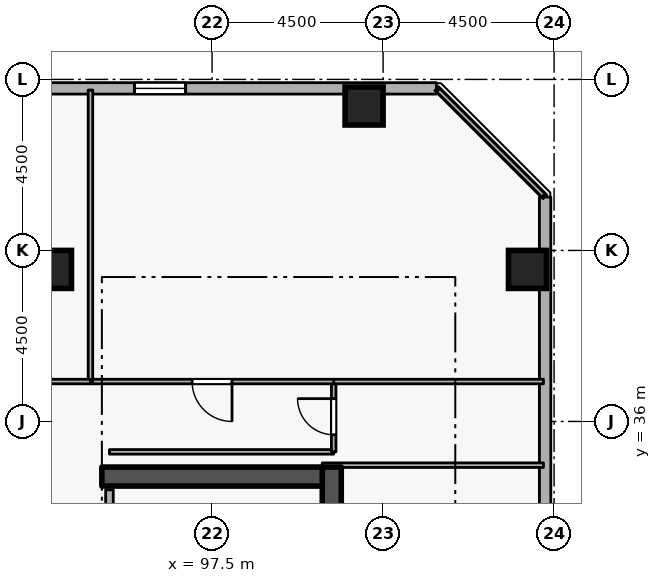
"""IFC4 building model, lengths in metres.
Left out: names, types, materials, properties, quantities, classifications, styles, units other than length and angle.
Written with IfcOpenShell. Run it as: python <this file> out.ifc"""

import sys

from ifc_helpers import new_model, si_unit, direction, frame, frame_2d, origin, origin_2d, place, context, subcontext, project, spatial, rectangle, extrude, element, fill, save


model = new_model("IFC4")
c1 = context("Model", 3, precision=1e-05, world=origin(), true_north=direction((0.0, 1.0)))
c2 = subcontext(c1, "Body", "Model", "MODEL_VIEW")
j1 = project(units=[si_unit("LENGTHUNIT", "METRE"), si_unit("PLANEANGLEUNIT", "RADIAN")], contexts=[c1])
p1 = place(None, origin())
s1 = spatial("IfcSite", under=j1, at=p1, CompositionType="ELEMENT")
p2 = place(p1, origin())
s2 = spatial("IfcBuilding", under=s1, at=p2, CompositionType="ELEMENT")
p3 = place(p2, frame((0.0, 0.0, 218.1)))
s3 = spatial("IfcBuildingStorey", under=s2, at=p3, CompositionType="ELEMENT", Elevation=218.1)
p4 = place(p3, frame((100.65, 19.2, 0.0), z_axis=(0.0, 0.0, 1.0), x_axis=(0.0, 1.0, 0.0)))
e1 = element("IfcWall", 1, at=p4, inside=s3, PredefinedType="SHEAR", context=c2, shape_type="SweptSolid", body=[
    extrude(rectangle(XDim=15.6, YDim=0.5, at=frame_2d((7.8, 0.0))), origin(), (0.0, 0.0, 1.0), 3.6),
])
p5 = place(p3, frame((94.6, 34.55, 0.0), z_axis=(0.0, 0.0, 1.0), x_axis=(1.0, 0.0, 0.0)))
e2 = element("IfcWall", 2, at=p5, inside=s3, PredefinedType="SHEAR", context=c2, shape_type="SweptSolid", body=[
    extrude(rectangle(XDim=5.8, YDim=0.5, at=frame_2d((2.9, 0.0))), origin(), (0.0, 0.0, 1.0), 3.6),
])
for number, where, z_axis, x_axis in (
    (3, (105.8, 40.0, 0.0), (0.0, 0.0, 1.0), (1.0, 0.0, 0.0)),
    (4, (101.5, 44.3, 0.0), (0.0, 0.0, 1.0), (1.0, 0.0, 0.0)),
    (5, (93.3, 40.0, 0.0), (0.0, 0.0, 1.0), (1.0, 0.0, 0.0)),
):
    element("IfcColumn", number, at=place(p3, frame(where, z_axis=z_axis, x_axis=x_axis)), inside=s3, PredefinedType="COLUMN", context=c2, shape_type="SweptSolid", body=[
        extrude(rectangle(XDim=1.0, YDim=1.0, at=origin_2d()), origin(), (0.0, 0.0, 1.0), 3.6),
    ])
p6 = place(p3, frame((106.265, 5.819, 0.0), z_axis=(0.0, 0.0, 1.0), x_axis=(-2.7061402e-05, 0.999999999634, 0.0)))
e6 = element("IfcWall", 6, at=p6, inside=s3, PredefinedType="STANDARD", context=c2, shape_type="SweptSolid", body=[
    extrude(rectangle(XDim=36.087, YDim=0.3, at=frame_2d((18.043, 0.0))), origin(), (0.0, 0.0, 1.0), 2.66),
])
p7 = place(p6, frame((1.8, 0.0, 0.72)))
e7 = element("IfcOpeningElement", 7, at=p7, cuts=e6, PredefinedType="OPENING", context=c2, shape_type="SweptSolid", body=[
    extrude(rectangle(XDim=1.35, YDim=1.05, at=frame_2d((0.675, 0.525))), frame((0.0, 0.16, 0.0), z_axis=(0.0, -1.0, 0.0), x_axis=(1.0, 0.0, 0.0)), (0.0, 0.0, 1.0), 0.32),
])
p8 = place(p6, frame((11.4, 0.0, 0.72)))
e8 = element("IfcOpeningElement", 8, at=p8, cuts=e6, PredefinedType="OPENING", context=c2, shape_type="SweptSolid", body=[
    extrude(rectangle(XDim=1.35, YDim=1.05, at=frame_2d((0.675, 0.525))), frame((0.0, 0.16, 0.0), z_axis=(0.0, -1.0, 0.0), x_axis=(1.0, 0.0, 0.0)), (0.0, 0.0, 1.0), 0.32),
])
p9 = place(p6, frame((16.2, 0.0, 0.72)))
e9 = element("IfcOpeningElement", 9, at=p9, cuts=e6, PredefinedType="OPENING", context=c2, shape_type="SweptSolid", body=[
    extrude(rectangle(XDim=1.35, YDim=1.05, at=frame_2d((0.675, 0.525))), frame((0.0, 0.16, 0.0), z_axis=(0.0, -1.0, 0.0), x_axis=(1.0, 0.0, 0.0)), (0.0, 0.0, 1.0), 0.32),
])
p10 = place(p6, frame((25.8, 0.0, 0.72)))
e10 = element("IfcOpeningElement", 10, at=p10, cuts=e6, PredefinedType="OPENING", context=c2, shape_type="SweptSolid", body=[
    extrude(rectangle(XDim=1.35, YDim=1.05, at=frame_2d((0.675, 0.525))), frame((0.0, 0.16, 0.0), z_axis=(0.0, -1.0, 0.0), x_axis=(1.0, 0.0, 0.0)), (0.0, 0.0, 1.0), 0.32),
])
p11 = place(p3, frame((103.406, 44.764, 0.0), z_axis=(0.0, 0.0, 1.0), x_axis=(-0.999999999634, 2.7061402e-05, 0.0)))
e11 = element("IfcWall", 11, at=p11, inside=s3, PredefinedType="STANDARD", context=c2, shape_type="SweptSolid", body=[
    extrude(rectangle(XDim=36.087, YDim=0.3, at=frame_2d((18.043, 0.0))), origin(), (0.0, 0.0, 1.0), 2.66),
])
p12 = place(p11, frame((6.6, 0.0, 0.72)))
e12 = element("IfcOpeningElement", 12, at=p12, cuts=e11, PredefinedType="OPENING", context=c2, shape_type="SweptSolid", body=[
    extrude(rectangle(XDim=1.35, YDim=1.05, at=frame_2d((0.675, 0.525))), frame((0.0, 0.16, 0.0), z_axis=(0.0, -1.0, 0.0), x_axis=(1.0, 0.0, 0.0)), (0.0, 0.0, 1.0), 0.32),
])
p13 = place(p11, frame((11.4, 0.0, 0.72)))
e13 = element("IfcOpeningElement", 13, at=p13, cuts=e11, PredefinedType="OPENING", context=c2, shape_type="SweptSolid", body=[
    extrude(rectangle(XDim=1.35, YDim=1.05, at=frame_2d((0.675, 0.525))), frame((0.0, 0.16, 0.0), z_axis=(0.0, -1.0, 0.0), x_axis=(1.0, 0.0, 0.0)), (0.0, 0.0, 1.0), 0.32),
])
p14 = place(p11, frame((16.2, 0.0, 0.72)))
e14 = element("IfcOpeningElement", 14, at=p14, cuts=e11, PredefinedType="OPENING", context=c2, shape_type="SweptSolid", body=[
    extrude(rectangle(XDim=1.35, YDim=1.05, at=frame_2d((0.675, 0.525))), frame((0.0, 0.16, 0.0), z_axis=(0.0, -1.0, 0.0), x_axis=(1.0, 0.0, 0.0)), (0.0, 0.0, 1.0), 0.32),
])
p15 = place(p11, frame((21.0, 0.0, 0.72)))
e15 = element("IfcOpeningElement", 15, at=p15, cuts=e11, PredefinedType="OPENING", context=c2, shape_type="SweptSolid", body=[
    extrude(rectangle(XDim=1.35, YDim=1.05, at=frame_2d((0.675, 0.525))), frame((0.0, 0.16, 0.0), z_axis=(0.0, -1.0, 0.0), x_axis=(1.0, 0.0, 0.0)), (0.0, 0.0, 1.0), 0.32),
])
p16 = place(p11, frame((30.6, 0.0, 0.72)))
e16 = element("IfcOpeningElement", 16, at=p16, cuts=e11, PredefinedType="OPENING", context=c2, shape_type="SweptSolid", body=[
    extrude(rectangle(XDim=1.35, YDim=1.05, at=frame_2d((0.675, 0.525))), frame((0.0, 0.16, 0.0), z_axis=(0.0, -1.0, 0.0), x_axis=(1.0, 0.0, 0.0)), (0.0, 0.0, 1.0), 0.32),
])
p17 = place(p3, frame((94.8, 32.0, 0.0), z_axis=(0.0, 0.0, 1.0), x_axis=(0.0, 1.0, 0.0)))
e17 = element("IfcWall", 17, at=p17, inside=s3, PredefinedType="STANDARD", context=c2, shape_type="SweptSolid", body=[
    extrude(rectangle(XDim=2.2, YDim=0.2, at=frame_2d((1.1, 0.0))), origin(), (0.0, 0.0, 1.0), 3.26),
])
p18 = place(p17, frame((0.525, 0.0, 0.0)))
e18 = element("IfcOpeningElement", 18, at=p18, cuts=e17, PredefinedType="OPENING", context=c2, shape_type="SweptSolid", body=[
    extrude(rectangle(XDim=1.15, YDim=2.1, at=frame_2d((0.575, 1.05))), frame((0.0, 0.11, 0.0), z_axis=(0.0, -1.0, 0.0), x_axis=(1.0, 0.0, 0.0)), (0.0, 0.0, 1.0), 0.22),
])
p19 = place(p3, frame((94.8, 35.2, 0.0), z_axis=(0.0, 0.0, 1.0), x_axis=(1.0, 0.0, 0.0)))
e19 = element("IfcWall", 19, at=p19, inside=s3, PredefinedType="PARTITIONING", context=c2, shape_type="SweptSolid", body=[
    extrude(rectangle(XDim=5.9, YDim=0.12, at=frame_2d((2.95, 0.0))), origin(), (0.0, 0.0, 1.0), 3.26),
])
p20 = place(p3, frame((100.7, 35.2, 0.0), z_axis=(0.0, 0.0, 1.0), x_axis=(0.0, 1.0, 0.0)))
e20 = element("IfcWall", 20, at=p20, inside=s3, PredefinedType="PARTITIONING", context=c2, shape_type="SweptSolid", body=[
    extrude(rectangle(XDim=1.85, YDim=0.12, at=frame_2d((0.925, 0.0))), origin(), (0.0, 0.0, 1.0), 3.26),
])
p21 = place(p20, frame((0.45, 0.0, 0.0)))
e21 = element("IfcOpeningElement", 21, at=p21, cuts=e20, PredefinedType="OPENING", context=c2, shape_type="SweptSolid", body=[
    extrude(rectangle(XDim=0.95, YDim=2.1, at=frame_2d((0.475, 1.05))), frame((0.0, 0.07, 0.0), z_axis=(0.0, -1.0, 0.0), x_axis=(1.0, 0.0, 0.0)), (0.0, 0.0, 1.0), 0.14),
])
p22 = place(p3, frame((100.7, 37.05, 0.0), z_axis=(0.0, 0.0, 1.0), x_axis=(1.0, 0.0, 0.0)))
e22 = element("IfcWall", 22, at=p22, inside=s3, PredefinedType="PARTITIONING", context=c2, shape_type="SweptSolid", body=[
    extrude(rectangle(XDim=5.52, YDim=0.12, at=frame_2d((2.76, 0.0))), origin(), (0.0, 0.0, 1.0), 3.26),
])
p23 = place(p3, frame((106.22, 34.85, 0.0), z_axis=(0.0, 0.0, 1.0), x_axis=(-1.0, 0.0, 0.0)))
e23 = element("IfcWall", 23, at=p23, inside=s3, PredefinedType="PARTITIONING", context=c2, shape_type="SweptSolid", body=[
    extrude(rectangle(XDim=5.82, YDim=0.12, at=frame_2d((2.91, 0.0))), origin(), (0.0, 0.0, 1.0), 2.465),
])
p24 = place(p3, frame((100.7, 37.05, 0.0), z_axis=(0.0, 0.0, 1.0), x_axis=(-1.0, 0.0, 0.0)))
e24 = element("IfcWall", 24, at=p24, inside=s3, PredefinedType="PARTITIONING", context=c2, shape_type="SweptSolid", body=[
    extrude(rectangle(XDim=6.4, YDim=0.12, at=frame_2d((3.2, 0.0))), origin(), (0.0, 0.0, 1.0), 3.26),
])
p25 = place(p24, frame((2.675, 0.0, 0.0)))
e25 = element("IfcOpeningElement", 25, at=p25, cuts=e24, PredefinedType="OPENING", context=c2, shape_type="SweptSolid", body=[
    extrude(rectangle(XDim=1.05, YDim=2.1, at=frame_2d((0.525, 1.05))), frame((0.0, 0.07, 0.0), z_axis=(0.0, -1.0, 0.0), x_axis=(1.0, 0.0, 0.0)), (0.0, 0.0, 1.0), 0.14),
])
p26 = place(p3, frame((94.3, 37.05, 0.0), z_axis=(0.0, 0.0, 1.0), x_axis=(0.0, 1.0, 0.0)))
e26 = element("IfcWall", 26, at=p26, inside=s3, PredefinedType="PARTITIONING", context=c2, shape_type="SweptSolid", body=[
    extrude(rectangle(XDim=7.67, YDim=0.12, at=frame_2d((3.835, 0.0))), origin(), (0.0, 0.0, 1.0), 3.26),
])
p27 = place(p3, frame((103.448, 44.72, 0.0), z_axis=(0.0, 0.0, 1.0), x_axis=(0.707106781187, -0.707106781187, 0.0)))
e27 = element("IfcWall", 27, at=p27, inside=s3, PredefinedType="PARTITIONING", context=c2, shape_type="SweptSolid", body=[
    extrude(rectangle(XDim=3.919, YDim=0.12, at=frame_2d((1.96, 0.0))), origin(), (0.0, 0.0, 1.0), 3.26),
])
p28 = place(p3, frame((94.3, 37.05, 0.0), z_axis=(0.0, 0.0, 1.0), x_axis=(-1.0, 0.0, 0.0)))
e28 = element("IfcWall", 28, at=p28, inside=s3, PredefinedType="PARTITIONING", context=c2, shape_type="SweptSolid", body=[
    extrude(rectangle(XDim=5.4, YDim=0.12, at=frame_2d((2.7, 0.0))), origin(), (0.0, 0.0, 1.0), 3.26),
])
p29 = place(p28, frame((2.225, 0.0, 0.0)))
e29 = element("IfcOpeningElement", 29, at=p29, cuts=e28, PredefinedType="OPENING", context=c2, shape_type="SweptSolid", body=[
    extrude(rectangle(XDim=0.95, YDim=2.1, at=frame_2d((0.475, 1.05))), frame((0.0, 0.07, 0.0), z_axis=(0.0, -1.0, 0.0), x_axis=(1.0, 0.0, 0.0)), (0.0, 0.0, 1.0), 0.14),
])
p30 = place(p12, origin())
e30 = element("IfcWindow", 30, at=p30, inside=s3, PartitioningType="SINGLE_PANEL", PredefinedType="WINDOW", context=c2, shape_type="SweptSolid", body=[
    extrude(rectangle(XDim=1.35, YDim=1.05, at=frame_2d((0.675, 0.525))), frame((0.0, 0.03, 0.0), z_axis=(0.0, -1.0, 0.0), x_axis=(1.0, 0.0, 0.0)), (0.0, 0.0, 1.0), 0.06),
])
fill(e12, e30)
p31 = place(p21, origin())
e31 = element("IfcDoor", 31, at=p31, inside=s3, OperationType="SINGLE_SWING_RIGHT", PredefinedType="DOOR", context=c2, shape_type="SweptSolid", body=[
    extrude(rectangle(XDim=0.95, YDim=2.1, at=frame_2d((0.475, 1.05))), frame((0.0, 0.025, 0.0), z_axis=(0.0, -1.0, 0.0), x_axis=(1.0, 0.0, 0.0)), (0.0, 0.0, 1.0), 0.05),
])
fill(e21, e31)
p32 = place(p25, origin())
e32 = element("IfcDoor", 32, at=p32, inside=s3, OperationType="SINGLE_SWING_LEFT", PredefinedType="DOOR", context=c2, shape_type="SweptSolid", body=[
    extrude(rectangle(XDim=1.05, YDim=2.1, at=frame_2d((0.525, 1.05))), frame((0.0, 0.025, 0.0), z_axis=(0.0, -1.0, 0.0), x_axis=(1.0, 0.0, 0.0)), (0.0, 0.0, 1.0), 0.05),
])
fill(e25, e32)
save(model, sys.argv[1])
